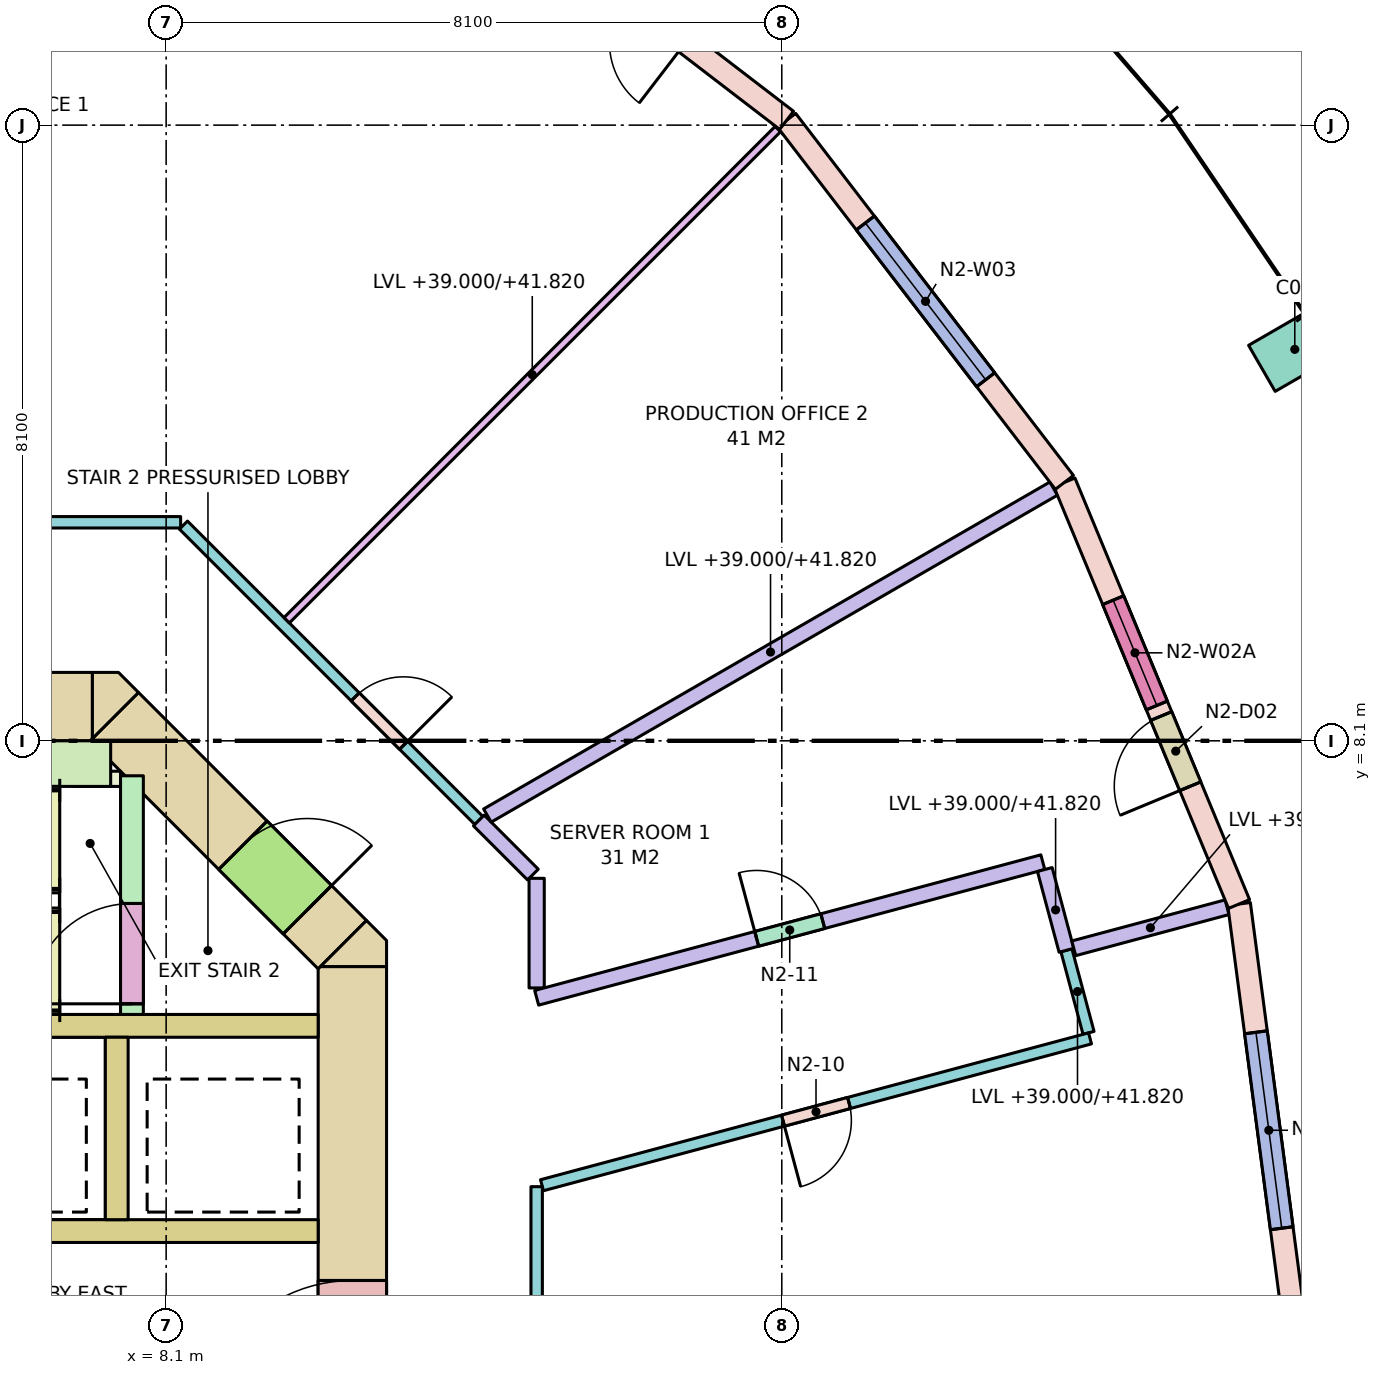
"""IFC4 building model, lengths in metres.
Left out: names, types, materials, properties, quantities, classifications, styles, units other than length and angle.
Written with IfcOpenShell. Run it as: python <this file> out.ifc"""

import sys

from ifc_helpers import new_model, si_unit, direction, frame, frame_2d, origin, origin_2d, place, context, subcontext, project, spatial, polyline, rectangle, outline, extrude, element, fill, save


model = new_model("IFC4")
c1 = context("Model", 3, precision=1e-05, world=origin(), true_north=direction((0.0, 1.0)))
c2 = subcontext(c1, "Body", "Model", "MODEL_VIEW")
j1 = project(units=[si_unit("LENGTHUNIT", "METRE"), si_unit("PLANEANGLEUNIT", "RADIAN")], contexts=[c1])
p1 = place(None, origin())
s1 = spatial("IfcSite", under=j1, at=p1, CompositionType="ELEMENT")
p2 = place(p1, origin())
s2 = spatial("IfcBuilding", under=s1, at=p2, CompositionType="ELEMENT")
p3 = place(p2, frame((0.0, 0.0, 39.0)))
s3 = spatial("IfcBuildingStorey", under=s2, at=p3, CompositionType="ELEMENT", Elevation=39.0)
p4 = place(p3, frame((22.95, 13.25, 0.0), z_axis=(0.0, 0.0, 1.0), x_axis=(-0.5, 0.866025403784, 0.0)))
e1 = element("IfcColumn", 1, at=p4, inside=s3, PredefinedType="COLUMN", context=c2, shape_type="SweptSolid", body=[
    extrude(rectangle(XDim=0.7, YDim=1.0, at=origin_2d()), origin(), (0.0, 0.0, 1.0), 4.0),
])
p5 = place(p3, frame((-7.13, 8.55, -0.28), z_axis=(0.0, 0.0, 1.0), x_axis=(1.0, 0.0, 0.0)))
e2 = element("IfcWall", 2, at=p5, inside=s3, PredefinedType="SHEAR", context=c2, shape_type="SweptSolid", body=[
    extrude(rectangle(XDim=14.26, YDim=0.9, at=frame_2d((7.13, 0.0))), origin(), (0.0, 0.0, 1.0), 4.0),
])
p6 = place(p5, frame((5.48, 0.0, 0.28)))
e3 = element("IfcOpeningElement", 3, at=p6, cuts=e2, PredefinedType="OPENING", context=c2, shape_type="SweptSolid", body=[
    extrude(rectangle(XDim=0.7, YDim=2.1, at=frame_2d((0.35, 1.05))), frame((0.0, 0.46, 0.0), z_axis=(0.0, -1.0, 0.0), x_axis=(1.0, 0.0, 0.0)), (0.0, 0.0, 1.0), 0.92),
])
p7 = place(p5, frame((6.53, 0.0, 0.28)))
e4 = element("IfcOpeningElement", 4, at=p7, cuts=e2, PredefinedType="OPENING", context=c2, shape_type="SweptSolid", body=[
    extrude(rectangle(XDim=0.85, YDim=2.1, at=frame_2d((0.425, 1.05))), frame((0.0, 0.46, 0.0), z_axis=(0.0, -1.0, 0.0), x_axis=(1.0, 0.0, 0.0)), (0.0, 0.0, 1.0), 0.92),
])
p8 = place(p5, frame((7.83, 0.0, 0.28)))
e5 = element("IfcOpeningElement", 5, at=p8, cuts=e2, PredefinedType="OPENING", context=c2, shape_type="SweptSolid", body=[
    extrude(rectangle(XDim=0.85, YDim=2.1, at=frame_2d((0.425, 1.05))), frame((0.0, 0.46, 0.0), z_axis=(0.0, -1.0, 0.0), x_axis=(1.0, 0.0, 0.0)), (0.0, 0.0, 1.0), 0.92),
])
p9 = place(p3, frame((10.55, -5.13, -0.28), z_axis=(0.0, 0.0, 1.0), x_axis=(0.0, 1.0, 0.0)))
e6 = element("IfcWall", 6, at=p9, inside=s3, PredefinedType="SHEAR", context=c2, shape_type="SweptSolid", body=[
    extrude(rectangle(XDim=10.26, YDim=0.9, at=frame_2d((5.13, 0.0))), origin(), (0.0, 0.0, 1.0), 4.0),
])
p10 = place(p9, frame((4.13, 0.0, 0.28)))
e7 = element("IfcOpeningElement", 7, at=p10, cuts=e6, PredefinedType="OPENING", context=c2, shape_type="SweptSolid", body=[
    extrude(rectangle(XDim=2.0, YDim=2.1, at=frame_2d((1.0, 1.05))), frame((0.0, 0.46, 0.0), z_axis=(0.0, -1.0, 0.0), x_axis=(1.0, 0.0, 0.0)), (0.0, 0.0, 1.0), 0.92),
])
p11 = place(p3, frame((7.418, 8.418, -0.28), z_axis=(0.0, 0.0, 1.0), x_axis=(0.707106781187, -0.707106781187, 0.0)))
e8 = element("IfcWall", 8, at=p11, inside=s3, PredefinedType="SHEAR", context=c2, shape_type="SweptSolid", body=[
    extrude(rectangle(XDim=4.243, YDim=0.9, at=frame_2d((2.121, 0.0))), origin(), (0.0, 0.0, 1.0), 4.0),
])
p12 = place(p11, frame((2.393, 0.0, 0.28)))
e9 = element("IfcOpeningElement", 9, at=p12, cuts=e8, PredefinedType="OPENING", context=c2, shape_type="SweptSolid", body=[
    extrude(rectangle(XDim=1.2, YDim=2.1, at=frame_2d((0.6, 1.05))), frame((0.0, 0.46, 0.0), z_axis=(0.0, -1.0, 0.0), x_axis=(1.0, 0.0, 0.0)), (0.0, 0.0, 1.0), 0.92),
])
p13 = place(p3, frame((0.0, 0.0, -0.28)))
e10 = element("IfcWall", 10, at=p13, inside=s3, PredefinedType="SHEAR", context=c2, shape_type="SweptSolid", body=[
    extrude(outline(polyline([(11.0, 5.473), (11.0, 5.13), (10.13, 5.13), (10.736, 5.736), (11.0, 5.473)])), origin(), (0.0, 0.0, 1.0), 4.0),
])
p14 = place(p3, frame((0.0, 0.0, -0.28)))
e11 = element("IfcWall", 11, at=p14, inside=s3, PredefinedType="SHEAR", context=c2, shape_type="SweptSolid", body=[
    extrude(outline(polyline([(7.473, 9.0), (7.736, 8.736), (7.13, 8.13), (7.13, 9.0), (7.473, 9.0)])), origin(), (0.0, 0.0, 1.0), 4.0),
])
for number, where, z_axis, x_axis in (
    (12, (2.0, 4.35, 0.0), (0.0, 0.0, 1.0), (1.0, 0.0, 0.0)),
    (13, (2.0, 1.65, 0.0), (0.0, 0.0, 1.0), (1.0, 0.0, 0.0)),
):
    element("IfcWall", number, at=place(p3, frame(where, z_axis=z_axis, x_axis=x_axis)), inside=s3, PredefinedType="SOLIDWALL", context=c2, shape_type="SweptSolid", body=[
        extrude(rectangle(XDim=8.1, YDim=0.3, at=frame_2d((4.05, 0.0))), origin(), (0.0, 0.0, 1.0), 3.72),
    ])
p15 = place(p3, frame((7.45, 1.8, 0.0), z_axis=(0.0, 0.0, 1.0), x_axis=(0.0, 1.0, 0.0)))
e14 = element("IfcWall", 14, at=p15, inside=s3, PredefinedType="SOLIDWALL", context=c2, shape_type="SweptSolid", body=[
    extrude(rectangle(XDim=2.4, YDim=0.3, at=frame_2d((1.2, 0.0))), origin(), (0.0, 0.0, 1.0), 3.72),
])
p16 = place(p3, frame((7.65, 4.5, 0.0), z_axis=(0.0, 0.0, 1.0), x_axis=(0.0, 1.0, 0.0)))
e15 = element("IfcWall", 15, at=p16, inside=s3, PredefinedType="SHEAR", context=c2, shape_type="SweptSolid", body=[
    extrude(rectangle(XDim=3.14, YDim=0.3, at=frame_2d((1.57, 0.0))), origin(), (0.0, 0.0, 1.0), 3.72),
])
p17 = place(p16, frame((0.14, 0.0, 0.0)))
e16 = element("IfcOpeningElement", 16, at=p17, cuts=e15, PredefinedType="OPENING", context=c2, shape_type="SweptSolid", body=[
    extrude(rectangle(XDim=1.32, YDim=2.1, at=frame_2d((0.66, 1.05))), frame((0.0, 0.16, 0.0), z_axis=(0.0, -1.0, 0.0), x_axis=(1.0, 0.0, 0.0)), (0.0, 0.0, 1.0), 0.32),
])
p18 = place(p3, frame((2.0, 7.8, 0.0), z_axis=(0.0, 0.0, 1.0), x_axis=(1.0, 0.0, 0.0)))
e17 = element("IfcWall", 17, at=p18, inside=s3, PredefinedType="SHEAR", context=c2, shape_type="SweptSolid", body=[
    extrude(rectangle(XDim=5.37, YDim=0.6, at=frame_2d((2.685, 0.0))), origin(), (0.0, 0.0, 1.0), 3.72),
])
p19 = place(p3, frame((6.9, 7.6, 0.0), z_axis=(0.0, 0.0, 1.0), x_axis=(1.0, 0.0, 0.0)))
e18 = element("IfcWall", 18, at=p19, inside=s3, PredefinedType="SHEAR", context=c2, shape_type="SweptSolid", body=[
    extrude(rectangle(XDim=0.6, YDim=0.2, at=frame_2d((0.3, 0.0))), origin(), (0.0, 0.0, 1.0), 3.72),
])
p20 = place(p3, frame((23.0, 0.0, 0.0), z_axis=(0.0, 0.0, 1.0), x_axis=(-0.130522880875, 0.991445297315, 0.0)))
e19 = element("IfcWall", 19, at=p20, inside=s3, PredefinedType="STANDARD", context=c2, shape_type="SweptSolid", body=[
    extrude(rectangle(XDim=6.004, YDim=0.3, at=frame_2d((3.002, 0.0))), origin(), (0.0, 0.0, 1.0), 3.72),
])
p21 = place(p20, frame((1.702, 0.0, 0.8)))
e20 = element("IfcOpeningElement", 20, at=p21, cuts=e19, PredefinedType="OPENING", context=c2, shape_type="SweptSolid", body=[
    extrude(rectangle(XDim=2.6, YDim=2.7, at=frame_2d((1.3, 1.35))), frame((0.0, 0.16, 0.0), z_axis=(0.0, -1.0, 0.0), x_axis=(1.0, 0.0, 0.0)), (0.0, 0.0, 1.0), 0.32),
])
p22 = place(p3, frame((22.216, 5.953, 0.0), z_axis=(0.0, 0.0, 1.0), x_axis=(-0.382671411433, 0.923884511653, 0.0)))
e21 = element("IfcWall", 21, at=p22, inside=s3, PredefinedType="STANDARD", context=c2, shape_type="SweptSolid", body=[
    extrude(rectangle(XDim=6.004, YDim=0.3, at=frame_2d((3.002, 0.0))), origin(), (0.0, 0.0, 1.0), 3.72),
])
p23 = place(p22, frame((1.677, 0.0, 0.0)))
e22 = element("IfcOpeningElement", 22, at=p23, cuts=e21, PredefinedType="OPENING", context=c2, shape_type="SweptSolid", body=[
    extrude(rectangle(XDim=1.0, YDim=2.4, at=frame_2d((0.5, 1.2))), frame((0.0, 0.16, 0.0), z_axis=(0.0, -1.0, 0.0), x_axis=(1.0, 0.0, 0.0)), (0.0, 0.0, 1.0), 0.32),
])
p24 = place(p22, frame((2.827, 0.0, 0.8)))
e23 = element("IfcOpeningElement", 23, at=p24, cuts=e21, PredefinedType="OPENING", context=c2, shape_type="SweptSolid", body=[
    extrude(rectangle(XDim=1.5, YDim=2.7, at=frame_2d((0.75, 1.35))), frame((0.0, 0.16, 0.0), z_axis=(0.0, -1.0, 0.0), x_axis=(1.0, 0.0, 0.0)), (0.0, 0.0, 1.0), 0.32),
])
p25 = place(p3, frame((19.919, 11.5, 0.0), z_axis=(0.0, 0.0, 1.0), x_axis=(-0.608778912074, 0.793339924758, 0.0)))
e24 = element("IfcWall", 24, at=p25, inside=s3, PredefinedType="STANDARD", context=c2, shape_type="SweptSolid", body=[
    extrude(rectangle(XDim=6.004, YDim=0.3, at=frame_2d((3.002, 0.0))), origin(), (0.0, 0.0, 1.0), 3.72),
])
p26 = place(p25, frame((1.702, 0.0, 0.8)))
e25 = element("IfcOpeningElement", 25, at=p26, cuts=e24, PredefinedType="OPENING", context=c2, shape_type="SweptSolid", body=[
    extrude(rectangle(XDim=2.6, YDim=2.7, at=frame_2d((1.3, 1.35))), frame((0.0, 0.16, 0.0), z_axis=(0.0, -1.0, 0.0), x_axis=(1.0, 0.0, 0.0)), (0.0, 0.0, 1.0), 0.32),
])
p27 = place(p3, frame((16.263, 16.263, 0.0), z_axis=(0.0, 0.0, 1.0), x_axis=(-0.793339924758, 0.608778912074, 0.0)))
e26 = element("IfcWall", 26, at=p27, inside=s3, PredefinedType="STANDARD", context=c2, shape_type="SweptSolid", body=[
    extrude(rectangle(XDim=6.004, YDim=0.3, at=frame_2d((3.002, 0.0))), origin(), (0.0, 0.0, 1.0), 3.72),
])
p28 = place(p27, frame((1.677, 0.0, 0.0)))
e27 = element("IfcOpeningElement", 27, at=p28, cuts=e26, PredefinedType="OPENING", context=c2, shape_type="SweptSolid", body=[
    extrude(rectangle(XDim=1.0, YDim=2.4, at=frame_2d((0.5, 1.2))), frame((0.0, 0.16, 0.0), z_axis=(0.0, -1.0, 0.0), x_axis=(1.0, 0.0, 0.0)), (0.0, 0.0, 1.0), 0.32),
])
p29 = place(p27, frame((2.827, 0.0, 0.8)))
e28 = element("IfcOpeningElement", 28, at=p29, cuts=e26, PredefinedType="OPENING", context=c2, shape_type="SweptSolid", body=[
    extrude(rectangle(XDim=1.5, YDim=2.7, at=frame_2d((0.75, 1.35))), frame((0.0, 0.16, 0.0), z_axis=(0.0, -1.0, 0.0), x_axis=(1.0, 0.0, 0.0)), (0.0, 0.0, 1.0), 0.32),
])
p30 = place(p3, frame((-8.291, 10.975, 0.0), z_axis=(0.0, 0.0, 1.0), x_axis=(1.0, 0.0, 0.0)))
e29 = element("IfcWall", 29, at=p30, inside=s3, PredefinedType="PARTITIONING", context=c2, shape_type="SweptSolid", body=[
    extrude(rectangle(XDim=16.582, YDim=0.15, at=frame_2d((8.291, 0.0))), origin(), (0.0, 0.0, 1.0), 2.82),
])
p31 = place(p30, frame((7.391, 0.0, 0.0)))
e30 = element("IfcOpeningElement", 30, at=p31, cuts=e29, PredefinedType="OPENING", context=c2, shape_type="SweptSolid", body=[
    extrude(rectangle(XDim=1.8, YDim=2.1, at=frame_2d((0.9, 1.05))), frame((0.0, 0.085, 0.0), z_axis=(0.0, -1.0, 0.0), x_axis=(1.0, 0.0, 0.0)), (0.0, 0.0, 1.0), 0.17),
])
p32 = place(p3, frame((8.328, 10.938, 0.0), z_axis=(0.0, 0.0, 1.0), x_axis=(0.707106781187, -0.707106781187, 0.0)))
e31 = element("IfcWall", 31, at=p32, inside=s3, PredefinedType="PARTITIONING", context=c2, shape_type="SweptSolid", body=[
    extrude(rectangle(XDim=5.496, YDim=0.15, at=frame_2d((2.748, 0.0))), origin(), (0.0, 0.0, 1.0), 2.82),
])
p33 = place(p32, frame((3.196, 0.0, 0.0)))
e32 = element("IfcOpeningElement", 32, at=p33, cuts=e31, PredefinedType="OPENING", context=c2, shape_type="SweptSolid", body=[
    extrude(rectangle(XDim=0.9, YDim=2.1, at=frame_2d((0.45, 1.05))), frame((0.0, 0.085, 0.0), z_axis=(0.0, -1.0, 0.0), x_axis=(1.0, 0.0, 0.0)), (0.0, 0.0, 1.0), 0.17),
])
p34 = place(p3, frame((12.214, 7.052, 0.0), z_axis=(0.0, 0.0, 1.0), x_axis=(0.707106781187, -0.707106781187, 0.0)))
e33 = element("IfcWall", 33, at=p34, inside=s3, PredefinedType="PARTITIONING", context=c2, shape_type="SweptSolid", body=[
    extrude(rectangle(XDim=1.006, YDim=0.2, at=frame_2d((0.503, 0.0))), origin(), (0.0, 0.0, 1.0), 2.82),
])
p35 = place(p3, frame((12.975, 6.291, 0.0), z_axis=(0.0, 0.0, 1.0), x_axis=(0.0, -1.0, 0.0)))
e34 = element("IfcWall", 34, at=p35, inside=s3, PredefinedType="PARTITIONING", context=c2, shape_type="SweptSolid", body=[
    extrude(rectangle(XDim=1.442, YDim=0.2, at=frame_2d((0.721, 0.0))), origin(), (0.0, 0.0, 1.0), 3.72),
])
p36 = place(p3, frame((12.975, 4.719, 0.0), z_axis=(0.0, 0.0, 1.0), x_axis=(0.965924499418, 0.258823997003, 0.0)))
e35 = element("IfcWall", 35, at=p36, inside=s3, PredefinedType="PARTITIONING", context=c2, shape_type="SweptSolid", body=[
    extrude(rectangle(XDim=6.894, YDim=0.2, at=frame_2d((3.447, 0.0))), origin(), (0.0, 0.0, 1.0), 3.72),
])
p37 = place(p36, frame((2.997, 0.0, 0.0)))
e36 = element("IfcOpeningElement", 36, at=p37, cuts=e35, PredefinedType="OPENING", context=c2, shape_type="SweptSolid", body=[
    extrude(rectangle(XDim=0.9, YDim=2.1, at=frame_2d((0.45, 1.05))), frame((0.0, 0.11, 0.0), z_axis=(0.0, -1.0, 0.0), x_axis=(1.0, 0.0, 0.0)), (0.0, 0.0, 1.0), 0.22),
])
p38 = place(p3, frame((19.66, 6.407, 0.0), z_axis=(0.0, 0.0, 1.0), x_axis=(0.258795254151, -0.965932200741, 0.0)))
e37 = element("IfcWall", 37, at=p38, inside=s3, PredefinedType="PARTITIONING", context=c2, shape_type="SweptSolid", body=[
    extrude(rectangle(XDim=1.1, YDim=0.2, at=frame_2d((0.55, 0.0))), origin(), (0.0, 0.0, 1.0), 2.82),
])
p39 = place(p3, frame((19.945, 5.344, 0.0), z_axis=(0.0, 0.0, 1.0), x_axis=(0.258891558609, -0.965906393436, 0.0)))
e38 = element("IfcWall", 38, at=p39, inside=s3, PredefinedType="PARTITIONING", context=c2, shape_type="SweptSolid", body=[
    extrude(rectangle(XDim=1.125, YDim=0.15, at=frame_2d((0.562, 0.0))), origin(), (0.0, 0.0, 1.0), 2.82),
])
p40 = place(p3, frame((20.256, 4.185, 0.0), z_axis=(0.0, 0.0, 1.0), x_axis=(-0.965924840231, -0.258822725092, 0.0)))
e39 = element("IfcWall", 39, at=p40, inside=s3, PredefinedType="PARTITIONING", context=c2, shape_type="SweptSolid", body=[
    extrude(rectangle(XDim=7.465, YDim=0.15, at=frame_2d((3.732, 0.0))), origin(), (0.0, 0.0, 1.0), 3.72),
])
p41 = place(p40, frame((3.282, 0.0, 0.0)))
e40 = element("IfcOpeningElement", 40, at=p41, cuts=e39, PredefinedType="OPENING", context=c2, shape_type="SweptSolid", body=[
    extrude(rectangle(XDim=0.9, YDim=2.1, at=frame_2d((0.45, 1.05))), frame((0.0, 0.085, 0.0), z_axis=(0.0, -1.0, 0.0), x_axis=(1.0, 0.0, 0.0)), (0.0, 0.0, 1.0), 0.17),
])
p42 = place(p3, frame((12.975, 2.234, 0.0), z_axis=(0.0, 0.0, 1.0), x_axis=(0.0, -1.0, 0.0)))
e41 = element("IfcWall", 41, at=p42, inside=s3, PredefinedType="PARTITIONING", context=c2, shape_type="SweptSolid", body=[
    extrude(rectangle(XDim=8.34, YDim=0.15, at=frame_2d((4.17, 0.0))), origin(), (0.0, 0.0, 1.0), 2.82),
])
p43 = place(p3, frame((20.042, 5.37, 0.0), z_axis=(0.0, 0.0, 1.0), x_axis=(0.965912035991, 0.258870505712, 0.0)))
e42 = element("IfcWall", 42, at=p43, inside=s3, PredefinedType="PARTITIONING", context=c2, shape_type="SweptSolid", body=[
    extrude(rectangle(XDim=2.088, YDim=0.2, at=frame_2d((1.044, 0.0))), origin(), (0.0, 0.0, 1.0), 2.82),
])
p44 = place(p3, frame((12.327, 7.117, 0.0), z_axis=(0.0, 0.0, 1.0), x_axis=(0.866013092914, 0.500021322448, 0.0)))
e43 = element("IfcWall", 43, at=p44, inside=s3, PredefinedType="PARTITIONING", context=c2, shape_type="SweptSolid", body=[
    extrude(rectangle(XDim=8.603, YDim=0.2, at=frame_2d((4.302, 0.0))), origin(), (0.0, 0.0, 1.0), 2.82),
])
p45 = place(p3, frame((9.686, 9.686, 0.0), z_axis=(0.0, 0.0, 1.0), x_axis=(0.707106781187, 0.707106781187, 0.0)))
e44 = element("IfcWall", 44, at=p45, inside=s3, PredefinedType="PARTITIONING", context=c2, shape_type="SweptSolid", body=[
    extrude(rectangle(XDim=9.138, YDim=0.1, at=frame_2d((4.569, 0.0))), origin(), (0.0, 0.0, 1.0), 2.82),
])
p46 = place(p21, origin())
e45 = element("IfcWindow", 45, at=p46, inside=s3, PartitioningType="SINGLE_PANEL", PredefinedType="WINDOW", context=c2, shape_type="SweptSolid", body=[
    extrude(rectangle(XDim=2.6, YDim=2.7, at=frame_2d((1.3, 1.35))), frame((0.0, 0.03, 0.0), z_axis=(0.0, -1.0, 0.0), x_axis=(1.0, 0.0, 0.0)), (0.0, 0.0, 1.0), 0.06),
])
fill(e20, e45)
p47 = place(p23, origin())
e46 = element("IfcDoor", 46, at=p47, inside=s3, OperationType="SINGLE_SWING_LEFT", PredefinedType="DOOR", context=c2, shape_type="SweptSolid", body=[
    extrude(rectangle(XDim=1.0, YDim=2.4, at=frame_2d((0.5, 1.2))), frame((0.0, 0.025, 0.0), z_axis=(0.0, -1.0, 0.0), x_axis=(1.0, 0.0, 0.0)), (0.0, 0.0, 1.0), 0.05),
])
fill(e22, e46)
p48 = place(p24, origin())
e47 = element("IfcWindow", 47, at=p48, inside=s3, PartitioningType="SINGLE_PANEL", PredefinedType="WINDOW", context=c2, shape_type="SweptSolid", body=[
    extrude(rectangle(XDim=1.5, YDim=2.7, at=frame_2d((0.75, 1.35))), frame((0.0, 0.03, 0.0), z_axis=(0.0, -1.0, 0.0), x_axis=(1.0, 0.0, 0.0)), (0.0, 0.0, 1.0), 0.06),
])
fill(e23, e47)
p49 = place(p26, origin())
e48 = element("IfcWindow", 48, at=p49, inside=s3, PartitioningType="SINGLE_PANEL", PredefinedType="WINDOW", context=c2, shape_type="SweptSolid", body=[
    extrude(rectangle(XDim=2.6, YDim=2.7, at=frame_2d((1.3, 1.35))), frame((0.0, 0.03, 0.0), z_axis=(0.0, -1.0, 0.0), x_axis=(1.0, 0.0, 0.0)), (0.0, 0.0, 1.0), 0.06),
])
fill(e25, e48)
p50 = place(p17, origin())
e49 = element("IfcDoor", 49, at=p50, inside=s3, OperationType="DOUBLE_DOOR_SINGLE_SWING", PredefinedType="DOOR", context=c2, shape_type="SweptSolid", body=[
    extrude(rectangle(XDim=1.32, YDim=2.1, at=frame_2d((0.66, 1.05))), frame((0.0, 0.025, 0.0), z_axis=(0.0, -1.0, 0.0), x_axis=(1.0, 0.0, 0.0)), (0.0, 0.0, 1.0), 0.05),
])
fill(e16, e49)
p51 = place(p12, origin())
e50 = element("IfcDoor", 50, at=p51, inside=s3, OperationType="SINGLE_SWING_RIGHT", PredefinedType="DOOR", context=c2, shape_type="SweptSolid", body=[
    extrude(rectangle(XDim=1.2, YDim=2.1, at=frame_2d((0.6, 1.05))), frame((0.0, 0.025, 0.0), z_axis=(0.0, -1.0, 0.0), x_axis=(1.0, 0.0, 0.0)), (0.0, 0.0, 1.0), 0.05),
])
fill(e9, e50)
p52 = place(p10, origin())
e51 = element("IfcDoor", 51, at=p52, inside=s3, OperationType="DOUBLE_DOOR_SINGLE_SWING", PredefinedType="DOOR", context=c2, shape_type="SweptSolid", body=[
    extrude(rectangle(XDim=2.0, YDim=2.1, at=frame_2d((1.0, 1.05))), frame((0.0, 0.025, 0.0), z_axis=(0.0, -1.0, 0.0), x_axis=(1.0, 0.0, 0.0)), (0.0, 0.0, 1.0), 0.05),
])
fill(e7, e51)
p53 = place(p41, origin())
e52 = element("IfcDoor", 52, at=p53, inside=s3, OperationType="SINGLE_SWING_RIGHT", PredefinedType="DOOR", context=c2, shape_type="SweptSolid", body=[
    extrude(rectangle(XDim=0.9, YDim=2.1, at=frame_2d((0.45, 1.05))), frame((0.0, 0.025, 0.0), z_axis=(0.0, -1.0, 0.0), x_axis=(1.0, 0.0, 0.0)), (0.0, 0.0, 1.0), 0.05),
])
fill(e40, e52)
p54 = place(p37, origin())
e53 = element("IfcDoor", 53, at=p54, inside=s3, OperationType="SINGLE_SWING_LEFT", PredefinedType="DOOR", context=c2, shape_type="SweptSolid", body=[
    extrude(rectangle(XDim=0.9, YDim=2.1, at=frame_2d((0.45, 1.05))), frame((0.0, 0.025, 0.0), z_axis=(0.0, -1.0, 0.0), x_axis=(1.0, 0.0, 0.0)), (0.0, 0.0, 1.0), 0.05),
])
fill(e36, e53)
p55 = place(p33, origin())
e54 = element("IfcDoor", 54, at=p55, inside=s3, OperationType="SINGLE_SWING_RIGHT", PredefinedType="DOOR", context=c2, shape_type="SweptSolid", body=[
    extrude(rectangle(XDim=0.9, YDim=2.1, at=frame_2d((0.45, 1.05))), frame((0.0, 0.025, 0.0), z_axis=(0.0, -1.0, 0.0), x_axis=(1.0, 0.0, 0.0)), (0.0, 0.0, 1.0), 0.05),
])
fill(e32, e54)
save(model, sys.argv[1])
